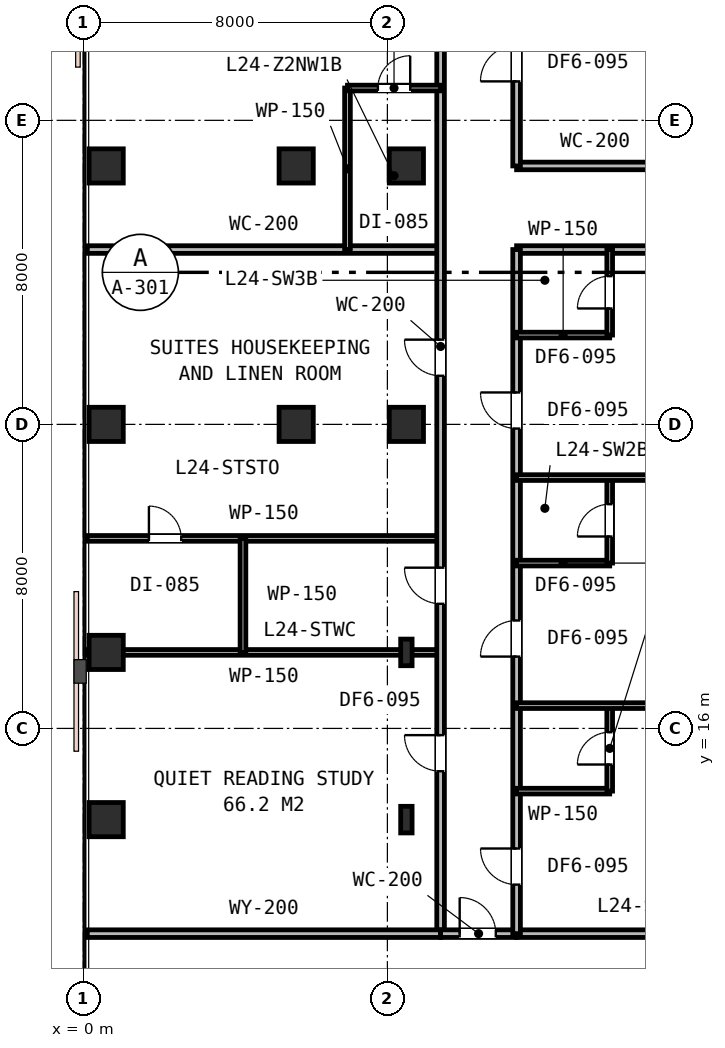
"""IFC4 building model, lengths in metres.
Left out: names, types, materials, properties, quantities, classifications, styles, units other than length and angle.
Written with IfcOpenShell. Run it as: python <this file> out.ifc"""

import sys

from ifc_helpers import new_model, si_unit, direction, frame, frame_2d, origin, origin_2d, place, context, subcontext, project, spatial, rectangle, i_section, extrude, element, fill, save


model = new_model("IFC4")
c1 = context("Model", 3, precision=1e-05, world=origin(), true_north=direction((0.0, 1.0)))
c2 = subcontext(c1, "Body", "Model", "MODEL_VIEW")
j1 = project(units=[si_unit("LENGTHUNIT", "METRE"), si_unit("PLANEANGLEUNIT", "RADIAN")], contexts=[c1])
p1 = place(None, origin())
s1 = spatial("IfcSite", under=j1, at=p1, CompositionType="ELEMENT")
p2 = place(p1, origin())
s2 = spatial("IfcBuilding", under=s1, at=p2, CompositionType="ELEMENT")
p3 = place(p2, frame((0.0, 0.0, 97.2)))
s3 = spatial("IfcBuildingStorey", under=s2, at=p3, CompositionType="ELEMENT", Elevation=97.2)
for number, where, z_axis, x_axis in (
    (1, (8.5, 24.0, 0.0), (0.0, 0.0, 1.0), (1.0, 0.0, 0.0)),
    (2, (5.6, 24.0, 0.0), (0.0, 0.0, 1.0), (1.0, 0.0, 0.0)),
    (3, (5.6, 30.8, 0.0), (0.0, 0.0, 1.0), (1.0, 0.0, 0.0)),
    (4, (8.5, 30.8, 0.0), (0.0, 0.0, 1.0), (1.0, 0.0, 0.0)),
    (5, (0.6, 24.0, 0.0), (0.0, 0.0, 1.0), (1.0, 0.0, 0.0)),
    (6, (0.6, 30.8, 0.0), (0.0, 0.0, 1.0), (1.0, 0.0, 0.0)),
    (7, (0.6, 13.6, 0.0), (0.0, 0.0, 1.0), (1.0, 0.0, 0.0)),
    (8, (0.6, 18.0, 0.0), (0.0, 0.0, 1.0), (1.0, 0.0, 0.0)),
):
    element("IfcColumn", number, at=place(p3, frame(where, z_axis=z_axis, x_axis=x_axis)), inside=s3, PredefinedType="COLUMN", context=c2, shape_type="SweptSolid", body=[
        extrude(rectangle(XDim=0.9, YDim=0.9, at=origin_2d()), origin(), (0.0, 0.0, 1.0), 3.6),
    ])
for number, where, z_axis, x_axis in (
    (9, (8.5, 13.6, 0.0), (0.0, 0.0, 1.0), (1.0, 0.0, 0.0)),
    (10, (8.5, 18.0, 0.0), (0.0, 0.0, 1.0), (1.0, 0.0, 0.0)),
):
    element("IfcColumn", number, at=place(p3, frame(where, z_axis=z_axis, x_axis=x_axis)), inside=s3, PredefinedType="COLUMN", context=c2, shape_type="SweptSolid", body=[
        extrude(i_section(OverallWidth=0.3, OverallDepth=0.7, WebThickness=0.017, FlangeThickness=0.032, FilletRadius=0.027, at=origin_2d()), origin(), (0.0, 0.0, 1.0), 3.6),
    ])
p4 = place(p3, frame((0.1, 28.6, 0.0), z_axis=(0.0, 0.0, 1.0), x_axis=(1.0, 0.0, 0.0)))
e11 = element("IfcWall", 11, at=p4, inside=s3, PredefinedType="PARTITIONING", context=c2, shape_type="SweptSolid", body=[
    extrude(rectangle(XDim=9.3, YDim=0.2, at=frame_2d((4.65, 0.0))), origin(), (0.0, 0.0, 1.0), 2.83),
])
p5 = place(p3, frame((11.4, 28.6, 0.0), z_axis=(0.0, 0.0, 1.0), x_axis=(1.0, 0.0, 0.0)))
e12 = element("IfcWall", 12, at=p5, inside=s3, PredefinedType="PARTITIONING", context=c2, shape_type="SweptSolid", body=[
    extrude(rectangle(XDim=32.8, YDim=0.2, at=frame_2d((16.4, 0.0))), origin(), (0.0, 0.0, 1.0), 2.83),
])
p6 = place(p5, frame((14.7, 0.0, 0.0)))
e13 = element("IfcOpeningElement", 13, at=p6, cuts=e12, PredefinedType="OPENING", context=c2, shape_type="SweptSolid", body=[
    extrude(rectangle(XDim=0.95, YDim=2.15, at=frame_2d((0.475, 1.075))), frame((0.0, 0.11, 0.0), z_axis=(0.0, -1.0, 0.0), x_axis=(1.0, 0.0, 0.0)), (0.0, 0.0, 1.0), 0.22),
])
p7 = place(p5, frame((22.475, 0.0, 0.0)))
e14 = element("IfcOpeningElement", 14, at=p7, cuts=e12, PredefinedType="OPENING", context=c2, shape_type="SweptSolid", body=[
    extrude(rectangle(XDim=0.95, YDim=2.15, at=frame_2d((0.475, 1.075))), frame((0.0, 0.11, 0.0), z_axis=(0.0, -1.0, 0.0), x_axis=(1.0, 0.0, 0.0)), (0.0, 0.0, 1.0), 0.22),
])
p8 = place(p5, frame((28.985, 0.0, 0.0)))
e15 = element("IfcOpeningElement", 15, at=p8, cuts=e12, PredefinedType="OPENING", context=c2, shape_type="SweptSolid", body=[
    extrude(rectangle(XDim=0.95, YDim=2.15, at=frame_2d((0.475, 1.075))), frame((0.0, 0.11, 0.0), z_axis=(0.0, -1.0, 0.0), x_axis=(1.0, 0.0, 0.0)), (0.0, 0.0, 1.0), 0.22),
])
p9 = place(p3, frame((11.4, 30.8, 0.0), z_axis=(0.0, 0.0, 1.0), x_axis=(1.0, 0.0, 0.0)))
e16 = element("IfcWall", 16, at=p9, inside=s3, PredefinedType="PARTITIONING", context=c2, shape_type="SweptSolid", body=[
    extrude(rectangle(XDim=4.13, YDim=0.2, at=frame_2d((2.065, 0.0))), origin(), (0.0, 0.0, 1.0), 2.83),
])
p10 = place(p3, frame((0.1, 18.0, 0.0), z_axis=(0.0, 0.0, 1.0), x_axis=(1.0, 0.0, 0.0)))
e17 = element("IfcWall", 17, at=p10, inside=s3, PredefinedType="PARTITIONING", context=c2, shape_type="SweptSolid", body=[
    extrude(rectangle(XDim=9.3, YDim=0.15, at=frame_2d((4.65, 0.0))), origin(), (0.0, 0.0, 1.0), 2.83),
])
p11 = place(p3, frame((0.1, 21.0, 0.0), z_axis=(0.0, 0.0, 1.0), x_axis=(1.0, 0.0, 0.0)))
e18 = element("IfcWall", 18, at=p11, inside=s3, PredefinedType="PARTITIONING", context=c2, shape_type="SweptSolid", body=[
    extrude(rectangle(XDim=9.3, YDim=0.15, at=frame_2d((4.65, 0.0))), origin(), (0.0, 0.0, 1.0), 2.83),
])
p12 = place(p11, frame((1.625, 0.0, 0.0)))
e19 = element("IfcOpeningElement", 19, at=p12, cuts=e18, PredefinedType="OPENING", context=c2, shape_type="SweptSolid", body=[
    extrude(rectangle(XDim=0.85, YDim=2.15, at=frame_2d((0.425, 1.075))), frame((0.0, 0.085, 0.0), z_axis=(0.0, -1.0, 0.0), x_axis=(1.0, 0.0, 0.0)), (0.0, 0.0, 1.0), 0.17),
])
p13 = place(p3, frame((4.2, 18.0, 0.0), z_axis=(0.0, 0.0, 1.0), x_axis=(0.0, 1.0, 0.0)))
e20 = element("IfcWall", 20, at=p13, inside=s3, PredefinedType="PARTITIONING", context=c2, shape_type="SweptSolid", body=[
    extrude(rectangle(XDim=3.0, YDim=0.15, at=frame_2d((1.5, 0.0))), origin(), (0.0, 0.0, 1.0), 2.83),
])
p14 = place(p3, frame((9.4, 10.6, 0.0), z_axis=(0.0, 0.0, 1.0), x_axis=(0.0, 1.0, 0.0)))
e21 = element("IfcWall", 21, at=p14, inside=s3, PredefinedType="PARTITIONING", context=c2, shape_type="SweptSolid", body=[
    extrude(rectangle(XDim=30.9, YDim=0.2, at=frame_2d((15.45, 0.0))), origin(), (0.0, 0.0, 1.0), 2.83),
])
p15 = place(p14, frame((8.679, 0.0, 0.0)))
e22 = element("IfcOpeningElement", 22, at=p15, cuts=e21, PredefinedType="OPENING", context=c2, shape_type="SweptSolid", body=[
    extrude(rectangle(XDim=0.95, YDim=2.15, at=frame_2d((0.475, 1.075))), frame((0.0, 0.11, 0.0), z_axis=(0.0, -1.0, 0.0), x_axis=(1.0, 0.0, 0.0)), (0.0, 0.0, 1.0), 0.22),
])
p16 = place(p14, frame((14.68, 0.0, 0.0)))
e23 = element("IfcOpeningElement", 23, at=p16, cuts=e21, PredefinedType="OPENING", context=c2, shape_type="SweptSolid", body=[
    extrude(rectangle(XDim=0.95, YDim=2.15, at=frame_2d((0.475, 1.075))), frame((0.0, 0.11, 0.0), z_axis=(0.0, -1.0, 0.0), x_axis=(1.0, 0.0, 0.0)), (0.0, 0.0, 1.0), 0.22),
])
p17 = place(p14, frame((4.273, 0.0, 0.0)))
e24 = element("IfcOpeningElement", 24, at=p17, cuts=e21, PredefinedType="OPENING", context=c2, shape_type="SweptSolid", body=[
    extrude(rectangle(XDim=0.95, YDim=2.15, at=frame_2d((0.475, 1.075))), frame((0.0, 0.11, 0.0), z_axis=(0.0, -1.0, 0.0), x_axis=(1.0, 0.0, 0.0)), (0.0, 0.0, 1.0), 0.22),
])
p18 = place(p14, frame((25.745, 0.0, 0.0)))
e25 = element("IfcOpeningElement", 25, at=p18, cuts=e21, PredefinedType="OPENING", context=c2, shape_type="SweptSolid", body=[
    extrude(rectangle(XDim=0.95, YDim=2.15, at=frame_2d((0.475, 1.075))), frame((0.0, 0.11, 0.0), z_axis=(0.0, -1.0, 0.0), x_axis=(1.0, 0.0, 0.0)), (0.0, 0.0, 1.0), 0.22),
])
p19 = place(p3, frame((6.95, 28.6, 0.0), z_axis=(0.0, 0.0, 1.0), x_axis=(0.0, 1.0, 0.0)))
e26 = element("IfcWall", 26, at=p19, inside=s3, PredefinedType="PARTITIONING", context=c2, shape_type="SweptSolid", body=[
    extrude(rectangle(XDim=4.25, YDim=0.15, at=frame_2d((2.125, 0.0))), origin(), (0.0, 0.0, 1.0), 2.83),
])
p20 = place(p3, frame((6.95, 32.85, 0.0), z_axis=(0.0, 0.0, 1.0), x_axis=(1.0, 0.0, 0.0)))
e27 = element("IfcWall", 27, at=p20, inside=s3, PredefinedType="PARTITIONING", context=c2, shape_type="SweptSolid", body=[
    extrude(rectangle(XDim=2.45, YDim=0.15, at=frame_2d((1.225, 0.0))), origin(), (0.0, 0.0, 1.0), 2.83),
])
p21 = place(p20, frame((0.8, 0.0, 0.0)))
e28 = element("IfcOpeningElement", 28, at=p21, cuts=e27, PredefinedType="OPENING", context=c2, shape_type="SweptSolid", body=[
    extrude(rectangle(XDim=0.85, YDim=2.15, at=frame_2d((0.425, 1.075))), frame((0.0, 0.085, 0.0), z_axis=(0.0, -1.0, 0.0), x_axis=(1.0, 0.0, 0.0)), (0.0, 0.0, 1.0), 0.17),
])
p22 = place(p3, frame((11.4, 30.8, 0.0), z_axis=(0.0, 0.0, 1.0), x_axis=(0.0, 1.0, 0.0)))
e29 = element("IfcWall", 29, at=p22, inside=s3, PredefinedType="PARTITIONING", context=c2, shape_type="SweptSolid", body=[
    extrude(rectangle(XDim=10.7, YDim=0.2, at=frame_2d((5.35, 0.0))), origin(), (0.0, 0.0, 1.0), 2.83),
])
p23 = place(p22, frame((2.225, 0.0, 0.0)))
e30 = element("IfcOpeningElement", 30, at=p23, cuts=e29, PredefinedType="OPENING", context=c2, shape_type="SweptSolid", body=[
    extrude(rectangle(XDim=0.95, YDim=2.15, at=frame_2d((0.475, 1.075))), frame((0.0, 0.11, 0.0), z_axis=(0.0, -1.0, 0.0), x_axis=(1.0, 0.0, 0.0)), (0.0, 0.0, 1.0), 0.22),
])
p24 = place(p22, frame((7.575, 0.0, 0.0)))
e31 = element("IfcOpeningElement", 31, at=p24, cuts=e29, PredefinedType="OPENING", context=c2, shape_type="SweptSolid", body=[
    extrude(rectangle(XDim=0.95, YDim=2.15, at=frame_2d((0.475, 1.075))), frame((0.0, 0.11, 0.0), z_axis=(0.0, -1.0, 0.0), x_axis=(1.0, 0.0, 0.0)), (0.0, 0.0, 1.0), 0.22),
])
p25 = place(p3, frame((0.1, 10.6, 0.0), z_axis=(0.0, 0.0, 1.0), x_axis=(1.0, 0.0, 0.0)))
e32 = element("IfcWall", 32, at=p25, inside=s3, PredefinedType="PARTITIONING", context=c2, shape_type="SweptSolid", body=[
    extrude(rectangle(XDim=9.3, YDim=0.2, at=frame_2d((4.65, 0.0))), origin(), (0.0, 0.0, 1.0), 2.83),
])
p26 = place(p3, frame((11.4, 10.6, 0.0), z_axis=(0.0, 0.0, 1.0), x_axis=(1.0, 0.0, 0.0)))
e33 = element("IfcWall", 33, at=p26, inside=s3, PredefinedType="PARTITIONING", context=c2, shape_type="SweptSolid", body=[
    extrude(rectangle(XDim=12.5, YDim=0.2, at=frame_2d((6.25, 0.0))), origin(), (0.0, 0.0, 1.0), 2.83),
])
p27 = place(p3, frame((9.4, 10.6, 0.0), z_axis=(0.0, 0.0, 1.0), x_axis=(1.0, 0.0, 0.0)))
e34 = element("IfcWall", 34, at=p27, inside=s3, PredefinedType="PARTITIONING", context=c2, shape_type="SweptSolid", body=[
    extrude(rectangle(XDim=2.0, YDim=0.2, at=frame_2d((1.0, 0.0))), origin(), (0.0, 0.0, 1.0), 3.02),
])
p28 = place(p27, frame((0.502, 0.0, 0.0)))
e35 = element("IfcOpeningElement", 35, at=p28, cuts=e34, PredefinedType="OPENING", context=c2, shape_type="SweptSolid", body=[
    extrude(rectangle(XDim=0.95, YDim=2.15, at=frame_2d((0.475, 1.075))), frame((0.0, 0.11, 0.0), z_axis=(0.0, -1.0, 0.0), x_axis=(1.0, 0.0, 0.0)), (0.0, 0.0, 1.0), 0.22),
])
p29 = place(p3, frame((11.4, 10.6, 0.0), z_axis=(0.0, 0.0, 1.0), x_axis=(0.0, 1.0, 0.0)))
e36 = element("IfcWall", 36, at=p29, inside=s3, PredefinedType="PARTITIONING", context=c2, shape_type="SweptSolid", body=[
    extrude(rectangle(XDim=18.0, YDim=0.2, at=frame_2d((9.0, 0.0))), origin(), (0.0, 0.0, 1.0), 2.83),
])
p30 = place(p29, frame((1.29, 0.0, 0.0)))
e37 = element("IfcOpeningElement", 37, at=p30, cuts=e36, PredefinedType="OPENING", context=c2, shape_type="SweptSolid", body=[
    extrude(rectangle(XDim=0.95, YDim=2.15, at=frame_2d((0.475, 1.075))), frame((0.0, 0.11, 0.0), z_axis=(0.0, -1.0, 0.0), x_axis=(1.0, 0.0, 0.0)), (0.0, 0.0, 1.0), 0.22),
])
p31 = place(p29, frame((7.29, 0.0, 0.0)))
e38 = element("IfcOpeningElement", 38, at=p31, cuts=e36, PredefinedType="OPENING", context=c2, shape_type="SweptSolid", body=[
    extrude(rectangle(XDim=0.95, YDim=2.15, at=frame_2d((0.475, 1.075))), frame((0.0, 0.11, 0.0), z_axis=(0.0, -1.0, 0.0), x_axis=(1.0, 0.0, 0.0)), (0.0, 0.0, 1.0), 0.22),
])
p32 = place(p29, frame((13.29, 0.0, 0.0)))
e39 = element("IfcOpeningElement", 39, at=p32, cuts=e36, PredefinedType="OPENING", context=c2, shape_type="SweptSolid", body=[
    extrude(rectangle(XDim=0.95, YDim=2.15, at=frame_2d((0.475, 1.075))), frame((0.0, 0.11, 0.0), z_axis=(0.0, -1.0, 0.0), x_axis=(1.0, 0.0, 0.0)), (0.0, 0.0, 1.0), 0.22),
])
p33 = place(p3, frame((11.4, 14.35, 0.0), z_axis=(0.0, 0.0, 1.0), x_axis=(1.0, 0.0, 0.0)))
e40 = element("IfcWall", 40, at=p33, inside=s3, PredefinedType="PARTITIONING", context=c2, shape_type="SweptSolid", body=[
    extrude(rectangle(XDim=2.45, YDim=0.15, at=frame_2d((1.225, 0.0))), origin(), (0.0, 0.0, 1.0), 3.02),
])
p34 = place(p3, frame((13.85, 14.35, 0.0), z_axis=(0.0, 0.0, 1.0), x_axis=(0.0, 1.0, 0.0)))
e41 = element("IfcWall", 41, at=p34, inside=s3, PredefinedType="PARTITIONING", context=c2, shape_type="SweptSolid", body=[
    extrude(rectangle(XDim=2.25, YDim=0.15, at=frame_2d((1.125, 0.0))), origin(), (0.0, 0.0, 1.0), 3.02),
])
p35 = place(p34, frame((0.7, 0.0, 0.0)))
e42 = element("IfcOpeningElement", 42, at=p35, cuts=e41, PredefinedType="OPENING", context=c2, shape_type="SweptSolid", body=[
    extrude(rectangle(XDim=0.85, YDim=2.15, at=frame_2d((0.425, 1.075))), frame((0.0, 0.085, 0.0), z_axis=(0.0, -1.0, 0.0), x_axis=(1.0, 0.0, 0.0)), (0.0, 0.0, 1.0), 0.17),
])
p36 = place(p3, frame((11.4, 16.6, 0.0), z_axis=(0.0, 0.0, 1.0), x_axis=(1.0, 0.0, 0.0)))
e43 = element("IfcWall", 43, at=p36, inside=s3, PredefinedType="PARTITIONING", context=c2, shape_type="SweptSolid", body=[
    extrude(rectangle(XDim=12.5, YDim=0.15, at=frame_2d((6.25, 0.0))), origin(), (0.0, 0.0, 1.0), 2.83),
])
p37 = place(p3, frame((11.4, 20.35, 0.0), z_axis=(0.0, 0.0, 1.0), x_axis=(1.0, 0.0, 0.0)))
e44 = element("IfcWall", 44, at=p37, inside=s3, PredefinedType="PARTITIONING", context=c2, shape_type="SweptSolid", body=[
    extrude(rectangle(XDim=2.45, YDim=0.15, at=frame_2d((1.225, 0.0))), origin(), (0.0, 0.0, 1.0), 3.33),
])
p38 = place(p3, frame((13.85, 20.35, 0.0), z_axis=(0.0, 0.0, 1.0), x_axis=(0.0, 1.0, 0.0)))
e45 = element("IfcWall", 45, at=p38, inside=s3, PredefinedType="PARTITIONING", context=c2, shape_type="SweptSolid", body=[
    extrude(rectangle(XDim=2.25, YDim=0.15, at=frame_2d((1.125, 0.0))), origin(), (0.0, 0.0, 1.0), 3.33),
])
p39 = place(p38, frame((0.7, 0.0, 0.0)))
e46 = element("IfcOpeningElement", 46, at=p39, cuts=e45, PredefinedType="OPENING", context=c2, shape_type="SweptSolid", body=[
    extrude(rectangle(XDim=0.85, YDim=2.15, at=frame_2d((0.425, 1.075))), frame((0.0, 0.085, 0.0), z_axis=(0.0, -1.0, 0.0), x_axis=(1.0, 0.0, 0.0)), (0.0, 0.0, 1.0), 0.17),
])
p40 = place(p3, frame((11.4, 22.6, 0.0), z_axis=(0.0, 0.0, 1.0), x_axis=(1.0, 0.0, 0.0)))
e47 = element("IfcWall", 47, at=p40, inside=s3, PredefinedType="PARTITIONING", context=c2, shape_type="SweptSolid", body=[
    extrude(rectangle(XDim=12.5, YDim=0.15, at=frame_2d((6.25, 0.0))), origin(), (0.0, 0.0, 1.0), 2.83),
])
p41 = place(p3, frame((11.4, 26.35, 0.0), z_axis=(0.0, 0.0, 1.0), x_axis=(1.0, 0.0, 0.0)))
e48 = element("IfcWall", 48, at=p41, inside=s3, PredefinedType="PARTITIONING", context=c2, shape_type="SweptSolid", body=[
    extrude(rectangle(XDim=2.45, YDim=0.15, at=frame_2d((1.225, 0.0))), origin(), (0.0, 0.0, 1.0), 3.33),
])
p42 = place(p3, frame((13.85, 26.35, 0.0), z_axis=(0.0, 0.0, 1.0), x_axis=(0.0, 1.0, 0.0)))
e49 = element("IfcWall", 49, at=p42, inside=s3, PredefinedType="PARTITIONING", context=c2, shape_type="SweptSolid", body=[
    extrude(rectangle(XDim=2.25, YDim=0.15, at=frame_2d((1.125, 0.0))), origin(), (0.0, 0.0, 1.0), 3.33),
])
p43 = place(p42, frame((0.7, 0.0, 0.0)))
e50 = element("IfcOpeningElement", 50, at=p43, cuts=e49, PredefinedType="OPENING", context=c2, shape_type="SweptSolid", body=[
    extrude(rectangle(XDim=0.85, YDim=2.15, at=frame_2d((0.425, 1.075))), frame((0.0, 0.085, 0.0), z_axis=(0.0, -1.0, 0.0), x_axis=(1.0, 0.0, 0.0)), (0.0, 0.0, 1.0), 0.17),
])
p44 = place(p15, origin())
e51 = element("IfcDoor", 51, at=p44, inside=s3, OperationType="SINGLE_SWING_RIGHT", PredefinedType="DOOR", context=c2, shape_type="SweptSolid", body=[
    extrude(rectangle(XDim=0.95, YDim=2.15, at=frame_2d((0.475, 1.075))), frame((0.0, 0.025, 0.0), z_axis=(0.0, -1.0, 0.0), x_axis=(1.0, 0.0, 0.0)), (0.0, 0.0, 1.0), 0.05),
])
fill(e22, e51)
p45 = place(p12, origin())
e52 = element("IfcDoor", 52, at=p45, inside=s3, OperationType="SINGLE_SWING_LEFT", PredefinedType="DOOR", context=c2, shape_type="SweptSolid", body=[
    extrude(rectangle(XDim=0.85, YDim=2.15, at=frame_2d((0.425, 1.075))), frame((0.0, 0.025, 0.0), z_axis=(0.0, -1.0, 0.0), x_axis=(1.0, 0.0, 0.0)), (0.0, 0.0, 1.0), 0.05),
])
fill(e19, e52)
p46 = place(p16, origin())
e53 = element("IfcDoor", 53, at=p46, inside=s3, OperationType="SINGLE_SWING_RIGHT", PredefinedType="DOOR", context=c2, shape_type="SweptSolid", body=[
    extrude(rectangle(XDim=0.95, YDim=2.15, at=frame_2d((0.475, 1.075))), frame((0.0, 0.025, 0.0), z_axis=(0.0, -1.0, 0.0), x_axis=(1.0, 0.0, 0.0)), (0.0, 0.0, 1.0), 0.05),
])
fill(e23, e53)
p47 = place(p17, origin())
e54 = element("IfcDoor", 54, at=p47, inside=s3, OperationType="SINGLE_SWING_RIGHT", PredefinedType="DOOR", context=c2, shape_type="SweptSolid", body=[
    extrude(rectangle(XDim=0.95, YDim=2.15, at=frame_2d((0.475, 1.075))), frame((0.0, 0.025, 0.0), z_axis=(0.0, -1.0, 0.0), x_axis=(1.0, 0.0, 0.0)), (0.0, 0.0, 1.0), 0.05),
])
fill(e24, e54)
p48 = place(p21, origin())
e55 = element("IfcDoor", 55, at=p48, inside=s3, OperationType="SINGLE_SWING_RIGHT", PredefinedType="DOOR", context=c2, shape_type="SweptSolid", body=[
    extrude(rectangle(XDim=0.85, YDim=2.15, at=frame_2d((0.425, 1.075))), frame((0.0, 0.025, 0.0), z_axis=(0.0, -1.0, 0.0), x_axis=(1.0, 0.0, 0.0)), (0.0, 0.0, 1.0), 0.05),
])
fill(e28, e55)
p49 = place(p23, origin())
e56 = element("IfcDoor", 56, at=p49, inside=s3, OperationType="SINGLE_SWING_LEFT", PredefinedType="DOOR", context=c2, shape_type="SweptSolid", body=[
    extrude(rectangle(XDim=0.95, YDim=2.15, at=frame_2d((0.475, 1.075))), frame((0.0, 0.025, 0.0), z_axis=(0.0, -1.0, 0.0), x_axis=(1.0, 0.0, 0.0)), (0.0, 0.0, 1.0), 0.05),
])
fill(e30, e56)
p50 = place(p28, origin())
e57 = element("IfcDoor", 57, at=p50, inside=s3, OperationType="SINGLE_SWING_LEFT", PredefinedType="DOOR", context=c2, shape_type="SweptSolid", body=[
    extrude(rectangle(XDim=0.95, YDim=2.15, at=frame_2d((0.475, 1.075))), frame((0.0, 0.025, 0.0), z_axis=(0.0, -1.0, 0.0), x_axis=(1.0, 0.0, 0.0)), (0.0, 0.0, 1.0), 0.05),
])
fill(e35, e57)
p51 = place(p30, origin())
e58 = element("IfcDoor", 58, at=p51, inside=s3, OperationType="SINGLE_SWING_RIGHT", PredefinedType="DOOR", context=c2, shape_type="SweptSolid", body=[
    extrude(rectangle(XDim=0.95, YDim=2.15, at=frame_2d((0.475, 1.075))), frame((0.0, 0.025, 0.0), z_axis=(0.0, -1.0, 0.0), x_axis=(1.0, 0.0, 0.0)), (0.0, 0.0, 1.0), 0.05),
])
fill(e37, e58)
p52 = place(p35, origin())
e59 = element("IfcDoor", 59, at=p52, inside=s3, OperationType="SINGLE_SWING_LEFT", PredefinedType="DOOR", context=c2, shape_type="SweptSolid", body=[
    extrude(rectangle(XDim=0.85, YDim=2.15, at=frame_2d((0.425, 1.075))), frame((0.0, 0.025, 0.0), z_axis=(0.0, -1.0, 0.0), x_axis=(1.0, 0.0, 0.0)), (0.0, 0.0, 1.0), 0.05),
])
fill(e42, e59)
p53 = place(p31, origin())
e60 = element("IfcDoor", 60, at=p53, inside=s3, OperationType="SINGLE_SWING_LEFT", PredefinedType="DOOR", context=c2, shape_type="SweptSolid", body=[
    extrude(rectangle(XDim=0.95, YDim=2.15, at=frame_2d((0.475, 1.075))), frame((0.0, 0.025, 0.0), z_axis=(0.0, -1.0, 0.0), x_axis=(1.0, 0.0, 0.0)), (0.0, 0.0, 1.0), 0.05),
])
fill(e38, e60)
p54 = place(p39, origin())
e61 = element("IfcDoor", 61, at=p54, inside=s3, OperationType="SINGLE_SWING_LEFT", PredefinedType="DOOR", context=c2, shape_type="SweptSolid", body=[
    extrude(rectangle(XDim=0.85, YDim=2.15, at=frame_2d((0.425, 1.075))), frame((0.0, 0.025, 0.0), z_axis=(0.0, -1.0, 0.0), x_axis=(1.0, 0.0, 0.0)), (0.0, 0.0, 1.0), 0.05),
])
fill(e46, e61)
p55 = place(p32, origin())
e62 = element("IfcDoor", 62, at=p55, inside=s3, OperationType="SINGLE_SWING_RIGHT", PredefinedType="DOOR", context=c2, shape_type="SweptSolid", body=[
    extrude(rectangle(XDim=0.95, YDim=2.15, at=frame_2d((0.475, 1.075))), frame((0.0, 0.025, 0.0), z_axis=(0.0, -1.0, 0.0), x_axis=(1.0, 0.0, 0.0)), (0.0, 0.0, 1.0), 0.05),
])
fill(e39, e62)
p56 = place(p43, origin())
e63 = element("IfcDoor", 63, at=p56, inside=s3, OperationType="SINGLE_SWING_LEFT", PredefinedType="DOOR", context=c2, shape_type="SweptSolid", body=[
    extrude(rectangle(XDim=0.85, YDim=2.15, at=frame_2d((0.425, 1.075))), frame((0.0, 0.025, 0.0), z_axis=(0.0, -1.0, 0.0), x_axis=(1.0, 0.0, 0.0)), (0.0, 0.0, 1.0), 0.05),
])
fill(e50, e63)
save(model, sys.argv[1])
